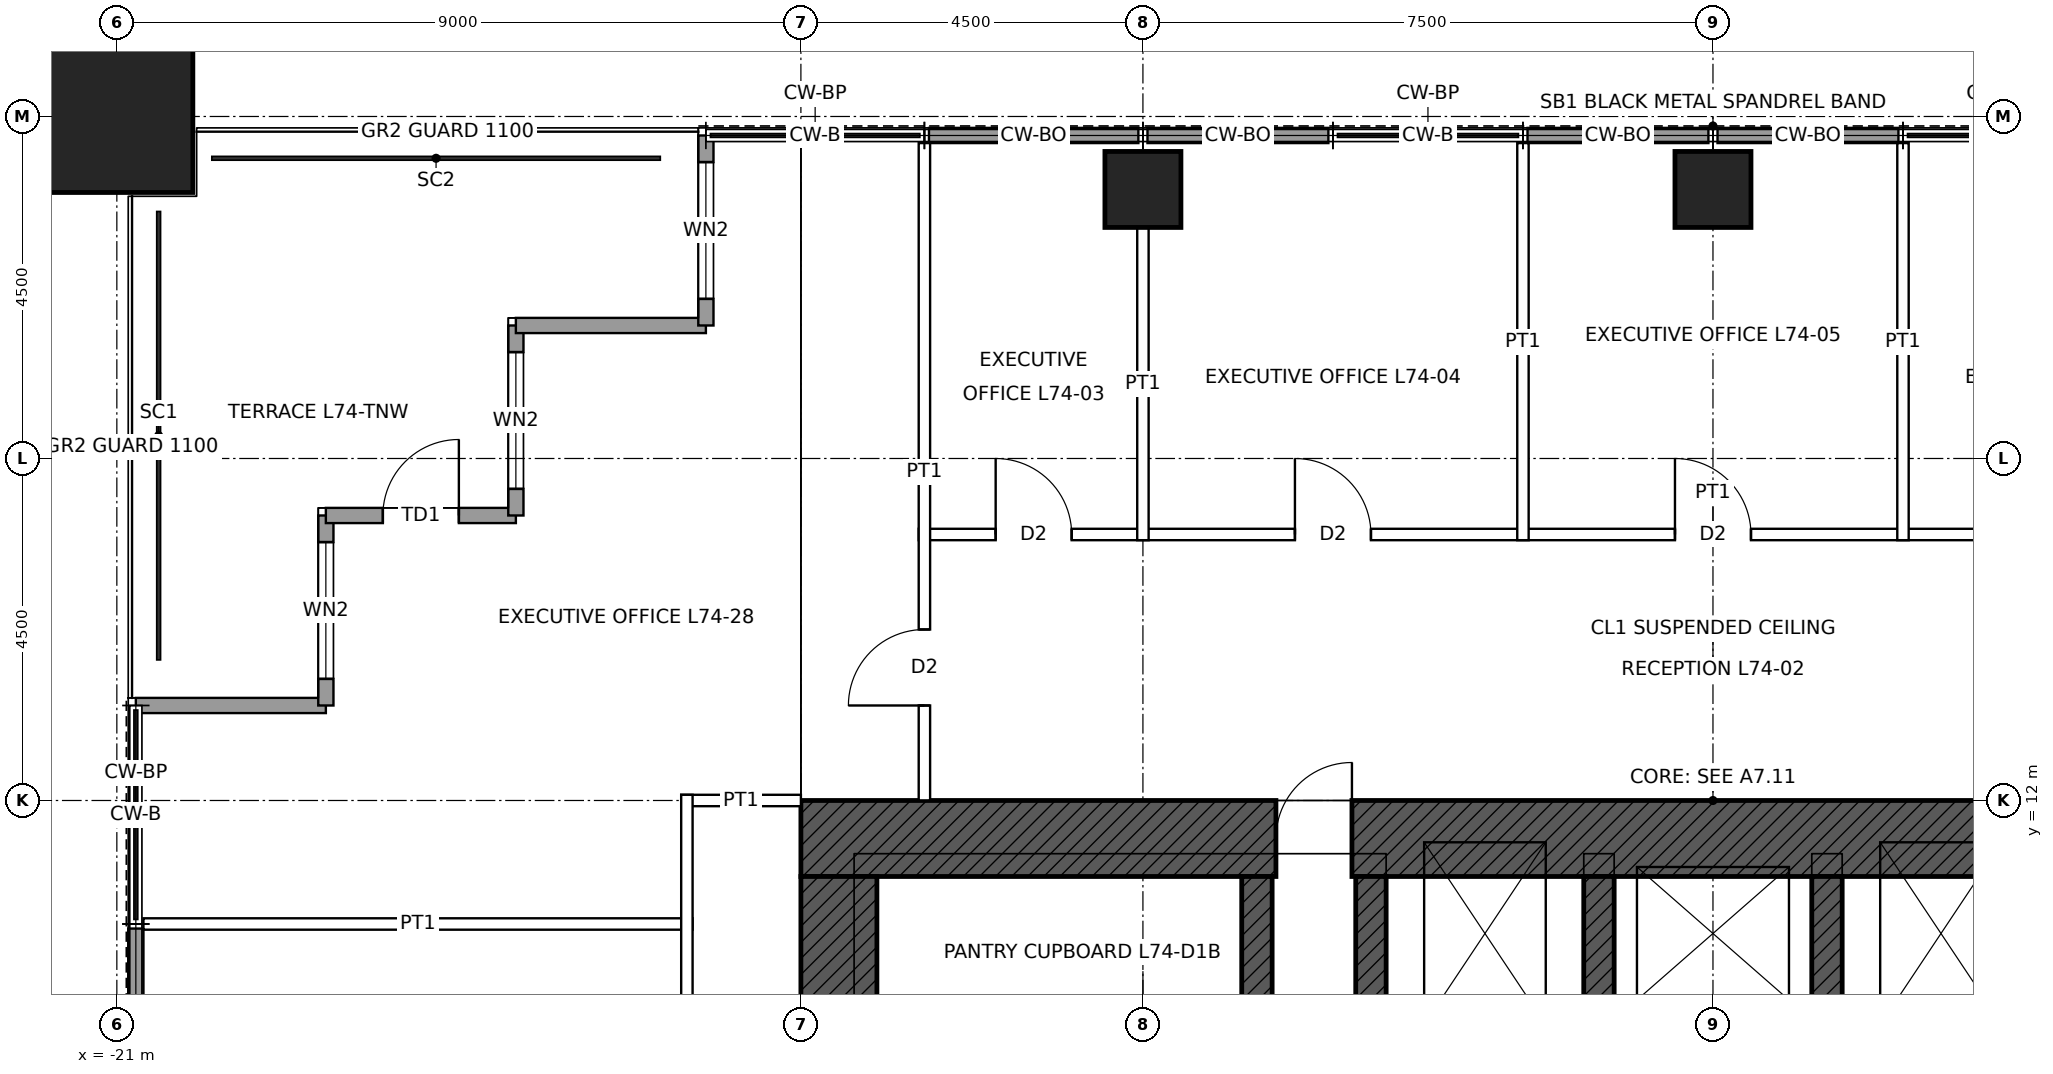
"""IFC4 building model, lengths in metres.
Left out: names, types, materials, properties, quantities, classifications, styles, units other than length and angle.
Written with IfcOpenShell. Run it as: python <this file> out.ifc"""

import sys

from ifc_helpers import new_model, si_unit, direction, frame, frame_2d, origin, origin_2d, place, context, subcontext, project, spatial, rectangle, hollow_rectangle, extrude, element, fill, save


model = new_model("IFC4")
c1 = context("Model", 3, precision=1e-05, world=origin(), true_north=direction((0.0, 1.0)))
c2 = subcontext(c1, "Body", "Model", "MODEL_VIEW")
j1 = project(units=[si_unit("LENGTHUNIT", "METRE"), si_unit("PLANEANGLEUNIT", "RADIAN")], contexts=[c1])
p1 = place(None, origin())
s1 = spatial("IfcSite", under=j1, at=p1, CompositionType="ELEMENT")
p2 = place(p1, origin())
s2 = spatial("IfcBuilding", under=s1, at=p2, CompositionType="ELEMENT")
p3 = place(p2, frame((0.0, 0.0, 331.9)))
s3 = spatial("IfcBuildingStorey", under=s2, at=p3, CompositionType="ELEMENT", Elevation=331.9)
p4 = place(p3, frame((-21.0, 21.0, 0.0), z_axis=(0.0, 0.0, 1.0), x_axis=(1.0, 0.0, 0.0)))
e1 = element("IfcColumn", 1, at=p4, inside=s3, PredefinedType="COLUMN", context=c2, shape_type="SweptSolid", body=[
    extrude(hollow_rectangle(XDim=2.0, YDim=2.0, WallThickness=0.095, at=origin_2d()), origin(), (0.0, 0.0, 1.0), 4.0),
])
for number, where, z_axis, x_axis in (
    (2, (-7.5, 20.04, 0.0), (0.0, 0.0, 1.0), (1.0, 0.0, 0.0)),
    (3, (0.0, 20.04, 0.0), (0.0, 0.0, 1.0), (1.0, 0.0, 0.0)),
):
    element("IfcColumn", number, at=place(p3, frame(where, z_axis=z_axis, x_axis=x_axis)), inside=s3, PredefinedType="COLUMN", context=c2, shape_type="SweptSolid", body=[
        extrude(hollow_rectangle(XDim=1.0, YDim=1.0, WallThickness=0.075, at=origin_2d()), origin(), (0.0, 0.0, 1.0), 4.0),
    ])
p5 = place(p3, frame((-12.0, 11.5, 0.0), z_axis=(0.0, 0.0, 1.0), x_axis=(1.0, 0.0, 0.0)))
e4 = element("IfcWall", 4, at=p5, inside=s3, PredefinedType="SHEAR", context=c2, shape_type="SweptSolid", body=[
    extrude(rectangle(XDim=24.0, YDim=1.0, at=frame_2d((12.0, 0.0))), origin(), (0.0, 0.0, 1.0), 4.0),
])
p6 = place(p5, frame((6.25, 0.0, 0.0)))
e5 = element("IfcOpeningElement", 5, at=p6, cuts=e4, PredefinedType="OPENING", context=c2, shape_type="SweptSolid", body=[
    extrude(rectangle(XDim=1.0, YDim=2.4, at=frame_2d((0.5, 1.2))), frame((0.0, 0.51, 0.0), z_axis=(0.0, -1.0, 0.0), x_axis=(1.0, 0.0, 0.0)), (0.0, 0.0, 1.0), 1.02),
])
p7 = place(p5, frame((16.75, 0.0, 0.0)))
e6 = element("IfcOpeningElement", 6, at=p7, cuts=e4, PredefinedType="OPENING", context=c2, shape_type="SweptSolid", body=[
    extrude(rectangle(XDim=1.0, YDim=2.4, at=frame_2d((0.5, 1.2))), frame((0.0, 0.51, 0.0), z_axis=(0.0, -1.0, 0.0), x_axis=(1.0, 0.0, 0.0)), (0.0, 0.0, 1.0), 1.02),
])
p8 = place(p3, frame((-11.5, -11.0, 0.0), z_axis=(0.0, 0.0, 1.0), x_axis=(0.0, 1.0, 0.0)))
e7 = element("IfcWall", 7, at=p8, inside=s3, PredefinedType="SHEAR", context=c2, shape_type="SweptSolid", body=[
    extrude(rectangle(XDim=22.0, YDim=1.0, at=frame_2d((11.0, 0.0))), origin(), (0.0, 0.0, 1.0), 4.0),
])
p9 = place(p8, frame((10.5, 0.0, 0.0)))
e8 = element("IfcOpeningElement", 8, at=p9, cuts=e7, PredefinedType="OPENING", context=c2, shape_type="SweptSolid", body=[
    extrude(rectangle(XDim=1.0, YDim=2.4, at=frame_2d((0.5, 1.2))), frame((0.0, 0.51, 0.0), z_axis=(0.0, -1.0, 0.0), x_axis=(1.0, 0.0, 0.0)), (0.0, 0.0, 1.0), 1.02),
])
p10 = place(p3, frame((-6.0, 4.5, 0.0), z_axis=(0.0, 0.0, 1.0), x_axis=(0.0, 1.0, 0.0)))
e9 = element("IfcWall", 9, at=p10, inside=s3, PredefinedType="SHEAR", context=c2, shape_type="SweptSolid", body=[
    extrude(rectangle(XDim=6.5, YDim=0.4, at=frame_2d((3.25, 0.0))), origin(), (0.0, 0.0, 1.0), 4.0),
])
p11 = place(p10, frame((0.6, 0.0, 0.0)))
e10 = element("IfcOpeningElement", 10, at=p11, cuts=e9, PredefinedType="OPENING", context=c2, shape_type="SweptSolid", body=[
    extrude(rectangle(XDim=1.0, YDim=2.1, at=frame_2d((0.5, 1.05))), frame((0.0, 0.21, 0.0), z_axis=(0.0, -1.0, 0.0), x_axis=(1.0, 0.0, 0.0)), (0.0, 0.0, 1.0), 0.42),
])
for number, where, z_axis, x_axis in (
    (11, (-4.5, 8.5, 0.0), (0.0, 0.0, 1.0), (0.0, 1.0, 0.0)),
    (12, (-1.5, 8.5, 0.0), (0.0, 0.0, 1.0), (0.0, 1.0, 0.0)),
    (13, (1.5, 8.5, 0.0), (0.0, 0.0, 1.0), (0.0, 1.0, 0.0)),
):
    element("IfcWall", number, at=place(p3, frame(where, z_axis=z_axis, x_axis=x_axis)), inside=s3, PredefinedType="SHEAR", context=c2, shape_type="SweptSolid", body=[
        extrude(rectangle(XDim=2.5, YDim=0.4, at=frame_2d((1.25, 0.0))), origin(), (0.0, 0.0, 1.0), 4.0),
    ])
p12 = place(p3, frame((-20.75, 13.25, 0.0), z_axis=(0.0, 0.0, 1.0), x_axis=(1.0, 0.0, 0.0)))
e14 = element("IfcWall", 14, at=p12, inside=s3, PredefinedType="SOLIDWALL", context=c2, shape_type="SweptSolid", body=[
    extrude(rectangle(XDim=2.5, YDim=0.2, at=frame_2d((1.25, 0.0))), origin(), (0.0, 0.0, 1.0), 3.8),
])
p13 = place(p3, frame((-18.25, 13.25, 0.0), z_axis=(0.0, 0.0, 1.0), x_axis=(0.0, 1.0, 0.0)))
e15 = element("IfcWall", 15, at=p13, inside=s3, PredefinedType="SOLIDWALL", context=c2, shape_type="SweptSolid", body=[
    extrude(rectangle(XDim=2.5, YDim=0.2, at=frame_2d((1.25, 0.0))), origin(), (0.0, 0.0, 1.0), 3.8),
])
p14 = place(p13, frame((0.35, 0.0, 0.3)))
e16 = element("IfcOpeningElement", 16, at=p14, cuts=e15, PredefinedType="OPENING", context=c2, shape_type="SweptSolid", body=[
    extrude(rectangle(XDim=1.8, YDim=2.4, at=frame_2d((0.9, 1.2))), frame((0.0, 0.11, 0.0), z_axis=(0.0, -1.0, 0.0), x_axis=(1.0, 0.0, 0.0)), (0.0, 0.0, 1.0), 0.22),
])
p15 = place(p3, frame((-18.25, 15.75, 0.0), z_axis=(0.0, 0.0, 1.0), x_axis=(1.0, 0.0, 0.0)))
e17 = element("IfcWall", 17, at=p15, inside=s3, PredefinedType="SOLIDWALL", context=c2, shape_type="SweptSolid", body=[
    extrude(rectangle(XDim=2.5, YDim=0.2, at=frame_2d((1.25, 0.0))), origin(), (0.0, 0.0, 1.0), 2.888),
])
p16 = place(p15, frame((0.75, 0.0, 0.0)))
e18 = element("IfcOpeningElement", 18, at=p16, cuts=e17, PredefinedType="OPENING", context=c2, shape_type="SweptSolid", body=[
    extrude(rectangle(XDim=1.0, YDim=2.4, at=frame_2d((0.5, 1.2))), frame((0.0, 0.11, 0.0), z_axis=(0.0, -1.0, 0.0), x_axis=(1.0, 0.0, 0.0)), (0.0, 0.0, 1.0), 0.22),
])
p17 = place(p3, frame((-15.75, 15.75, 0.0), z_axis=(0.0, 0.0, 1.0), x_axis=(0.0, 1.0, 0.0)))
e19 = element("IfcWall", 19, at=p17, inside=s3, PredefinedType="SOLIDWALL", context=c2, shape_type="SweptSolid", body=[
    extrude(rectangle(XDim=2.5, YDim=0.2, at=frame_2d((1.25, 0.0))), origin(), (0.0, 0.0, 1.0), 3.8),
])
p18 = place(p17, frame((0.35, 0.0, 0.3)))
e20 = element("IfcOpeningElement", 20, at=p18, cuts=e19, PredefinedType="OPENING", context=c2, shape_type="SweptSolid", body=[
    extrude(rectangle(XDim=1.8, YDim=2.4, at=frame_2d((0.9, 1.2))), frame((0.0, 0.11, 0.0), z_axis=(0.0, -1.0, 0.0), x_axis=(1.0, 0.0, 0.0)), (0.0, 0.0, 1.0), 0.22),
])
p19 = place(p3, frame((-15.75, 18.25, 0.0), z_axis=(0.0, 0.0, 1.0), x_axis=(1.0, 0.0, 0.0)))
e21 = element("IfcWall", 21, at=p19, inside=s3, PredefinedType="SOLIDWALL", context=c2, shape_type="SweptSolid", body=[
    extrude(rectangle(XDim=2.5, YDim=0.2, at=frame_2d((1.25, 0.0))), origin(), (0.0, 0.0, 1.0), 3.8),
])
p20 = place(p3, frame((-13.25, 18.25, 0.0), z_axis=(0.0, 0.0, 1.0), x_axis=(0.0, 1.0, 0.0)))
e22 = element("IfcWall", 22, at=p20, inside=s3, PredefinedType="SOLIDWALL", context=c2, shape_type="SweptSolid", body=[
    extrude(rectangle(XDim=2.5, YDim=0.2, at=frame_2d((1.25, 0.0))), origin(), (0.0, 0.0, 1.0), 3.8),
])
p21 = place(p20, frame((0.35, 0.0, 0.3)))
e23 = element("IfcOpeningElement", 23, at=p21, cuts=e22, PredefinedType="OPENING", context=c2, shape_type="SweptSolid", body=[
    extrude(rectangle(XDim=1.8, YDim=2.4, at=frame_2d((0.9, 1.2))), frame((0.0, 0.11, 0.0), z_axis=(0.0, -1.0, 0.0), x_axis=(1.0, 0.0, 0.0)), (0.0, 0.0, 1.0), 0.22),
])
p22 = place(p3, frame((-10.315, 20.75, 0.0), z_axis=(0.0, 0.0, 1.0), x_axis=(1.0, 0.0, 0.0)))
e24 = element("IfcWall", 24, at=p22, inside=s3, PredefinedType="SOLIDWALL", context=c2, shape_type="SweptSolid", body=[
    extrude(rectangle(XDim=2.755, YDim=0.2, at=frame_2d((1.377, 0.0))), origin(), (0.0, 0.0, 1.0), 3.8),
])
for number, where, z_axis, x_axis in (
    (25, (-7.44, 20.75, 0.0), (0.0, 0.0, 1.0), (1.0, 0.0, 0.0)),
    (26, (-2.44, 20.75, 0.0), (0.0, 0.0, 1.0), (1.0, 0.0, 0.0)),
    (27, (0.06, 20.75, 0.0), (0.0, 0.0, 1.0), (1.0, 0.0, 0.0)),
):
    element("IfcWall", number, at=place(p3, frame(where, z_axis=z_axis, x_axis=x_axis)), inside=s3, PredefinedType="SOLIDWALL", context=c2, shape_type="SweptSolid", body=[
        extrude(rectangle(XDim=2.38, YDim=0.2, at=frame_2d((1.19, 0.0))), origin(), (0.0, 0.0, 1.0), 3.8),
    ])
p23 = place(p3, frame((-20.75, 7.56, 0.0), z_axis=(0.0, 0.0, 1.0), x_axis=(0.0, 1.0, 0.0)))
e28 = element("IfcWall", 28, at=p23, inside=s3, PredefinedType="SOLIDWALL", context=c2, shape_type="SweptSolid", body=[
    extrude(rectangle(XDim=2.755, YDim=0.2, at=frame_2d((1.377, 0.0))), origin(), (0.0, 0.0, 1.0), 3.8),
])
p24 = place(p3, frame((-20.65, 10.375, 0.0), z_axis=(0.0, 0.0, 1.0), x_axis=(1.0, 0.0, 0.0)))
e29 = element("IfcWall", 29, at=p24, inside=s3, PredefinedType="PARTITIONING", context=c2, shape_type="SweptSolid", body=[
    extrude(rectangle(XDim=7.225, YDim=0.15, at=frame_2d((3.612, 0.0))), origin(), (0.0, 0.0, 1.0), 3.8),
])
p25 = place(p3, frame((-13.575, 12.0, 0.0), z_axis=(0.0, 0.0, 1.0), x_axis=(1.0, 0.0, 0.0)))
e30 = element("IfcWall", 30, at=p25, inside=s3, PredefinedType="PARTITIONING", context=c2, shape_type="SweptSolid", body=[
    extrude(rectangle(XDim=1.575, YDim=0.15, at=frame_2d((0.788, 0.0))), origin(), (0.0, 0.0, 1.0), 3.8),
])
p26 = place(p3, frame((-10.45, 15.5, 0.0), z_axis=(0.0, 0.0, 1.0), x_axis=(1.0, 0.0, 0.0)))
e31 = element("IfcWall", 31, at=p26, inside=s3, PredefinedType="PARTITIONING", context=c2, shape_type="SweptSolid", body=[
    extrude(rectangle(XDim=20.9, YDim=0.15, at=frame_2d((10.45, 0.0))), origin(), (0.0, 0.0, 1.0), 3.8),
])
p27 = place(p26, frame((1.012, 0.0, 0.0)))
e32 = element("IfcOpeningElement", 32, at=p27, cuts=e31, PredefinedType="OPENING", context=c2, shape_type="SweptSolid", body=[
    extrude(rectangle(XDim=1.0, YDim=2.1, at=frame_2d((0.5, 1.05))), frame((0.0, 0.085, 0.0), z_axis=(0.0, -1.0, 0.0), x_axis=(1.0, 0.0, 0.0)), (0.0, 0.0, 1.0), 0.17),
])
p28 = place(p26, frame((4.95, 0.0, 0.0)))
e33 = element("IfcOpeningElement", 33, at=p28, cuts=e31, PredefinedType="OPENING", context=c2, shape_type="SweptSolid", body=[
    extrude(rectangle(XDim=1.0, YDim=2.1, at=frame_2d((0.5, 1.05))), frame((0.0, 0.085, 0.0), z_axis=(0.0, -1.0, 0.0), x_axis=(1.0, 0.0, 0.0)), (0.0, 0.0, 1.0), 0.17),
])
p29 = place(p26, frame((9.95, 0.0, 0.0)))
e34 = element("IfcOpeningElement", 34, at=p29, cuts=e31, PredefinedType="OPENING", context=c2, shape_type="SweptSolid", body=[
    extrude(rectangle(XDim=1.0, YDim=2.1, at=frame_2d((0.5, 1.05))), frame((0.0, 0.085, 0.0), z_axis=(0.0, -1.0, 0.0), x_axis=(1.0, 0.0, 0.0)), (0.0, 0.0, 1.0), 0.17),
])
p30 = place(p26, frame((14.95, 0.0, 0.0)))
e35 = element("IfcOpeningElement", 35, at=p30, cuts=e31, PredefinedType="OPENING", context=c2, shape_type="SweptSolid", body=[
    extrude(rectangle(XDim=1.0, YDim=2.1, at=frame_2d((0.5, 1.05))), frame((0.0, 0.085, 0.0), z_axis=(0.0, -1.0, 0.0), x_axis=(1.0, 0.0, 0.0)), (0.0, 0.0, 1.0), 0.17),
])
p31 = place(p26, frame((18.887, 0.0, 0.0)))
e36 = element("IfcOpeningElement", 36, at=p31, cuts=e31, PredefinedType="OPENING", context=c2, shape_type="SweptSolid", body=[
    extrude(rectangle(XDim=1.0, YDim=2.1, at=frame_2d((0.5, 1.05))), frame((0.0, 0.085, 0.0), z_axis=(0.0, -1.0, 0.0), x_axis=(1.0, 0.0, 0.0)), (0.0, 0.0, 1.0), 0.17),
])
p32 = place(p3, frame((-13.5, 4.925, 0.0), z_axis=(0.0, 0.0, 1.0), x_axis=(0.0, 1.0, 0.0)))
e37 = element("IfcWall", 37, at=p32, inside=s3, PredefinedType="PARTITIONING", context=c2, shape_type="SweptSolid", body=[
    extrude(rectangle(XDim=7.15, YDim=0.15, at=frame_2d((3.575, 0.0))), origin(), (0.0, 0.0, 1.0), 3.8),
])
p33 = place(p32, frame((2.262, 0.0, 0.0)))
e38 = element("IfcOpeningElement", 38, at=p33, cuts=e37, PredefinedType="OPENING", context=c2, shape_type="SweptSolid", body=[
    extrude(rectangle(XDim=1.0, YDim=2.4, at=frame_2d((0.5, 1.2))), frame((0.0, 0.085, 0.0), z_axis=(0.0, -1.0, 0.0), x_axis=(1.0, 0.0, 0.0)), (0.0, 0.0, 1.0), 0.17),
])
p34 = place(p3, frame((-10.375, 12.0, 0.0), z_axis=(0.0, 0.0, 1.0), x_axis=(0.0, 1.0, 0.0)))
e39 = element("IfcWall", 39, at=p34, inside=s3, PredefinedType="PARTITIONING", context=c2, shape_type="SweptSolid", body=[
    extrude(rectangle(XDim=8.65, YDim=0.15, at=frame_2d((4.325, 0.0))), origin(), (0.0, 0.0, 1.0), 3.8),
])
p35 = place(p34, frame((1.25, 0.0, 0.0)))
e40 = element("IfcOpeningElement", 40, at=p35, cuts=e39, PredefinedType="OPENING", context=c2, shape_type="SweptSolid", body=[
    extrude(rectangle(XDim=1.0, YDim=2.1, at=frame_2d((0.5, 1.05))), frame((0.0, 0.085, 0.0), z_axis=(0.0, -1.0, 0.0), x_axis=(1.0, 0.0, 0.0)), (0.0, 0.0, 1.0), 0.17),
])
p36 = place(p3, frame((-7.5, 15.425, 0.0), z_axis=(0.0, 0.0, 1.0), x_axis=(0.0, 1.0, 0.0)))
e41 = element("IfcWall", 41, at=p36, inside=s3, PredefinedType="PARTITIONING", context=c2, shape_type="SweptSolid", body=[
    extrude(rectangle(XDim=4.115, YDim=0.15, at=frame_2d((2.058, 0.0))), origin(), (0.0, 0.0, 1.0), 2.769),
])
for number, where, z_axis, x_axis in (
    (42, (-2.5, 15.425, 0.0), (0.0, 0.0, 1.0), (0.0, 1.0, 0.0)),
    (43, (2.5, 15.425, 0.0), (0.0, 0.0, 1.0), (0.0, 1.0, 0.0)),
):
    element("IfcWall", number, at=place(p3, frame(where, z_axis=z_axis, x_axis=x_axis)), inside=s3, PredefinedType="PARTITIONING", context=c2, shape_type="SweptSolid", body=[
        extrude(rectangle(XDim=5.225, YDim=0.15, at=frame_2d((2.612, 0.0))), origin(), (0.0, 0.0, 1.0), 3.8),
    ])
p37 = place(p14, origin())
e44 = element("IfcWindow", 44, at=p37, inside=s3, PartitioningType="SINGLE_PANEL", PredefinedType="WINDOW", context=c2, shape_type="SweptSolid", body=[
    extrude(rectangle(XDim=1.8, YDim=2.4, at=frame_2d((0.9, 1.2))), frame((0.0, 0.03, 0.0), z_axis=(0.0, -1.0, 0.0), x_axis=(1.0, 0.0, 0.0)), (0.0, 0.0, 1.0), 0.06),
])
fill(e16, e44)
p38 = place(p16, origin())
e45 = element("IfcDoor", 45, at=p38, inside=s3, OperationType="SINGLE_SWING_RIGHT", PredefinedType="DOOR", context=c2, shape_type="SweptSolid", body=[
    extrude(rectangle(XDim=1.0, YDim=2.4, at=frame_2d((0.5, 1.2))), frame((0.0, 0.025, 0.0), z_axis=(0.0, -1.0, 0.0), x_axis=(1.0, 0.0, 0.0)), (0.0, 0.0, 1.0), 0.05),
])
fill(e18, e45)
p39 = place(p18, origin())
e46 = element("IfcWindow", 46, at=p39, inside=s3, PartitioningType="SINGLE_PANEL", PredefinedType="WINDOW", context=c2, shape_type="SweptSolid", body=[
    extrude(rectangle(XDim=1.8, YDim=2.4, at=frame_2d((0.9, 1.2))), frame((0.0, 0.03, 0.0), z_axis=(0.0, -1.0, 0.0), x_axis=(1.0, 0.0, 0.0)), (0.0, 0.0, 1.0), 0.06),
])
fill(e20, e46)
p40 = place(p21, origin())
e47 = element("IfcWindow", 47, at=p40, inside=s3, PartitioningType="SINGLE_PANEL", PredefinedType="WINDOW", context=c2, shape_type="SweptSolid", body=[
    extrude(rectangle(XDim=1.8, YDim=2.4, at=frame_2d((0.9, 1.2))), frame((0.0, 0.03, 0.0), z_axis=(0.0, -1.0, 0.0), x_axis=(1.0, 0.0, 0.0)), (0.0, 0.0, 1.0), 0.06),
])
fill(e23, e47)
p41 = place(p6, origin())
e48 = element("IfcDoor", 48, at=p41, inside=s3, OperationType="SINGLE_SWING_RIGHT", PredefinedType="DOOR", context=c2, shape_type="SweptSolid", body=[
    extrude(rectangle(XDim=1.0, YDim=2.4, at=frame_2d((0.5, 1.2))), frame((0.0, 0.485, 0.0), z_axis=(0.0, -1.0, 0.0), x_axis=(1.0, 0.0, 0.0)), (0.0, 0.0, 1.0), 0.05),
])
fill(e5, e48)
p42 = place(p27, origin())
e49 = element("IfcDoor", 49, at=p42, inside=s3, OperationType="SINGLE_SWING_LEFT", PredefinedType="DOOR", context=c2, shape_type="SweptSolid", body=[
    extrude(rectangle(XDim=1.0, YDim=2.1, at=frame_2d((0.5, 1.05))), frame((0.0, 0.025, 0.0), z_axis=(0.0, -1.0, 0.0), x_axis=(1.0, 0.0, 0.0)), (0.0, 0.0, 1.0), 0.05),
])
fill(e32, e49)
p43 = place(p28, origin())
e50 = element("IfcDoor", 50, at=p43, inside=s3, OperationType="SINGLE_SWING_LEFT", PredefinedType="DOOR", context=c2, shape_type="SweptSolid", body=[
    extrude(rectangle(XDim=1.0, YDim=2.1, at=frame_2d((0.5, 1.05))), frame((0.0, 0.025, 0.0), z_axis=(0.0, -1.0, 0.0), x_axis=(1.0, 0.0, 0.0)), (0.0, 0.0, 1.0), 0.05),
])
fill(e33, e50)
p44 = place(p29, origin())
e51 = element("IfcDoor", 51, at=p44, inside=s3, OperationType="SINGLE_SWING_LEFT", PredefinedType="DOOR", context=c2, shape_type="SweptSolid", body=[
    extrude(rectangle(XDim=1.0, YDim=2.1, at=frame_2d((0.5, 1.05))), frame((0.0, 0.025, 0.0), z_axis=(0.0, -1.0, 0.0), x_axis=(1.0, 0.0, 0.0)), (0.0, 0.0, 1.0), 0.05),
])
fill(e34, e51)
p45 = place(p35, origin())
e52 = element("IfcDoor", 52, at=p45, inside=s3, OperationType="SINGLE_SWING_LEFT", PredefinedType="DOOR", context=c2, shape_type="SweptSolid", body=[
    extrude(rectangle(XDim=1.0, YDim=2.1, at=frame_2d((0.5, 1.05))), frame((0.0, 0.025, 0.0), z_axis=(0.0, -1.0, 0.0), x_axis=(1.0, 0.0, 0.0)), (0.0, 0.0, 1.0), 0.05),
])
fill(e40, e52)
save(model, sys.argv[1])
